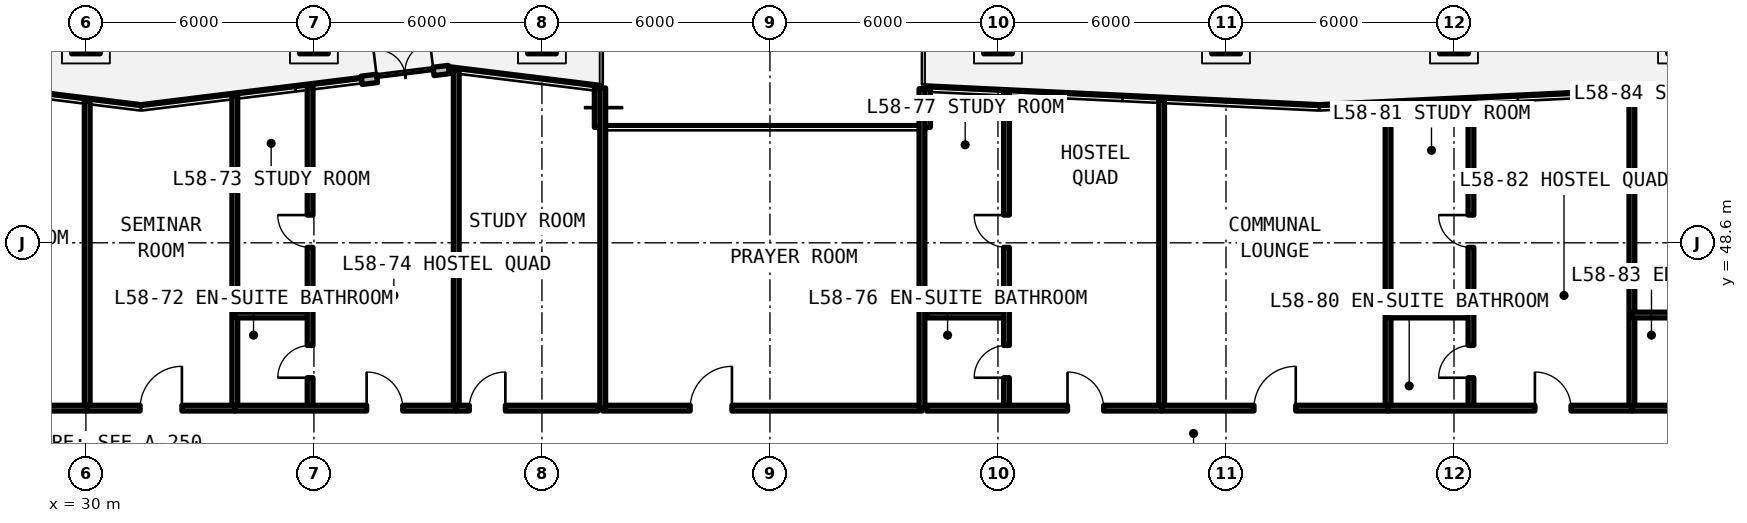
"""IFC4 building model, lengths in metres.
Left out: names, types, materials, properties, quantities, classifications, styles, units other than length and angle.
Written with IfcOpenShell. Run it as: python <this file> out.ifc"""

import sys

from ifc_helpers import new_model, si_unit, direction, frame, frame_2d, origin, origin_2d, place, context, subcontext, project, spatial, rectangle, extrude, element, fill, save


model = new_model("IFC4")
c1 = context("Model", 3, precision=1e-05, world=origin(), true_north=direction((0.0, 1.0)))
c2 = subcontext(c1, "Body", "Model", "MODEL_VIEW")
j1 = project(units=[si_unit("LENGTHUNIT", "METRE"), si_unit("PLANEANGLEUNIT", "RADIAN")], contexts=[c1])
p1 = place(None, origin())
s1 = spatial("IfcSite", under=j1, at=p1, CompositionType="ELEMENT")
p2 = place(p1, origin())
s2 = spatial("IfcBuilding", under=s1, at=p2, CompositionType="ELEMENT")
p3 = place(p2, frame((0.0, 0.0, 208.23)))
s3 = spatial("IfcBuildingStorey", under=s2, at=p3, CompositionType="ELEMENT", Elevation=208.23)
for number, where, z_axis, x_axis in (
    (1, (30.0, 53.95, 0.0), (0.0, 0.0, 1.0), (1.0, 0.0, 0.0)),
    (2, (36.0, 53.95, 0.0), (0.0, 0.0, 1.0), (1.0, 0.0, 0.0)),
    (3, (42.0, 53.95, 0.0), (0.0, 0.0, 1.0), (1.0, 0.0, 0.0)),
    (4, (54.0, 53.95, 0.0), (0.0, 0.0, 1.0), (1.0, 0.0, 0.0)),
    (5, (60.0, 53.95, 0.0), (0.0, 0.0, 1.0), (1.0, 0.0, 0.0)),
    (6, (66.0, 53.95, 0.0), (0.0, 0.0, 1.0), (1.0, 0.0, 0.0)),
):
    element("IfcColumn", number, at=place(p3, frame(where, z_axis=z_axis, x_axis=x_axis)), inside=s3, PredefinedType="COLUMN", context=c2, shape_type="SweptSolid", body=[
        extrude(rectangle(XDim=0.75, YDim=0.75, at=origin_2d()), origin(), (0.0, 0.0, 1.0), 3.63),
    ])
p4 = place(p3, frame((52.11, 52.655, 0.0), z_axis=(0.0, 0.0, 1.0), x_axis=(0.0, -1.0, 0.0)))
e7 = element("IfcWall", 7, at=p4, inside=s3, PredefinedType="SOLIDWALL", context=c2, shape_type="SweptSolid", body=[
    extrude(rectangle(XDim=1.015, YDim=0.22, at=frame_2d((0.507, 0.0))), origin(), (0.0, 0.0, 1.0), 3.41),
])
p5 = place(p3, frame((43.49, 51.64, 0.0), z_axis=(0.0, 0.0, 1.0), x_axis=(0.0, 1.0, 0.0)))
e8 = element("IfcWall", 8, at=p5, inside=s3, PredefinedType="SOLIDWALL", context=c2, shape_type="SweptSolid", body=[
    extrude(rectangle(XDim=1.033, YDim=0.22, at=frame_2d((0.516, 0.0))), origin(), (0.0, 0.0, 1.0), 3.41),
])
p6 = place(p3, frame((39.55, 53.159, 0.0), z_axis=(0.0, 0.0, 1.0), x_axis=(-0.992470150867, -0.122486732494, 0.0)))
e9 = element("IfcWall", 9, at=p6, inside=s3, PredefinedType="SOLIDWALL", context=c2, shape_type="SweptSolid", body=[
    extrude(rectangle(XDim=2.31, YDim=0.22, at=frame_2d((1.155, 0.0))), origin(), (0.0, 0.0, 1.0), 3.41),
])
p7 = place(p6, frame((0.405, 0.0, 0.0)))
e10 = element("IfcOpeningElement", 10, at=p7, cuts=e9, PredefinedType="OPENING", context=c2, shape_type="SweptSolid", body=[
    extrude(rectangle(XDim=1.5, YDim=2.2, at=frame_2d((0.75, 1.1))), frame((0.0, 0.12, 0.0), z_axis=(0.0, -1.0, 0.0), x_axis=(1.0, 0.0, 0.0)), (0.0, 0.0, 1.0), 0.24),
])
p8 = place(p3, frame((43.6, 44.25, 0.0), z_axis=(0.0, 0.0, 1.0), x_axis=(1.0, 0.0, 0.0)))
e11 = element("IfcWall", 11, at=p8, inside=s3, PredefinedType="SOLIDWALL", context=c2, shape_type="SweptSolid", body=[
    extrude(rectangle(XDim=8.4, YDim=0.15, at=frame_2d((4.2, 0.0))), origin(), (0.0, 0.0, 1.0), 2.63),
])
p9 = place(p8, frame((2.3, 0.0, 0.0)))
e12 = element("IfcOpeningElement", 12, at=p9, cuts=e11, PredefinedType="OPENING", context=c2, shape_type="SweptSolid", body=[
    extrude(rectangle(XDim=1.1, YDim=2.15, at=frame_2d((0.55, 1.075))), frame((0.0, 0.085, 0.0), z_axis=(0.0, -1.0, 0.0), x_axis=(1.0, 0.0, 0.0)), (0.0, 0.0, 1.0), 0.17),
])
p10 = place(p3, frame((43.6, 44.25, 0.0), z_axis=(0.0, 0.0, 1.0), x_axis=(0.0, 1.0, 0.0)))
e13 = element("IfcWall", 13, at=p10, inside=s3, PredefinedType="SOLIDWALL", context=c2, shape_type="SweptSolid", body=[
    extrude(rectangle(XDim=8.424, YDim=0.15, at=frame_2d((4.212, 0.0))), origin(), (0.0, 0.0, 1.0), 2.63),
])
p11 = place(p3, frame((52.0, 44.25, 0.0), z_axis=(0.0, 0.0, 1.0), x_axis=(0.0, 1.0, 0.0)))
e14 = element("IfcWall", 14, at=p11, inside=s3, PredefinedType="SOLIDWALL", context=c2, shape_type="SweptSolid", body=[
    extrude(rectangle(XDim=8.404, YDim=0.15, at=frame_2d((4.202, 0.0))), origin(), (0.0, 0.0, 1.0), 2.63),
])
p12 = place(p3, frame((30.034, 44.25, 0.0), z_axis=(0.0, 0.0, 1.0), x_axis=(0.0, 1.0, 0.0)))
e15 = element("IfcWall", 15, at=p12, inside=s3, PredefinedType="SOLIDWALL", context=c2, shape_type="SweptSolid", body=[
    extrude(rectangle(XDim=8.084, YDim=0.15, at=frame_2d((4.042, 0.0))), origin(), (0.0, 0.0, 1.0), 2.63),
])
p13 = place(p3, frame((26.0, 44.25, 0.0), z_axis=(0.0, 0.0, 1.0), x_axis=(1.0, 0.0, 0.0)))
e16 = element("IfcWall", 16, at=p13, inside=s3, PredefinedType="SOLIDWALL", context=c2, shape_type="SweptSolid", body=[
    extrude(rectangle(XDim=4.034, YDim=0.15, at=frame_2d((2.017, 0.0))), origin(), (0.0, 0.0, 1.0), 2.63),
])
p14 = place(p13, frame((1.542, 0.0, 0.0)))
e17 = element("IfcOpeningElement", 17, at=p14, cuts=e16, PredefinedType="OPENING", context=c2, shape_type="SweptSolid", body=[
    extrude(rectangle(XDim=0.95, YDim=2.15, at=frame_2d((0.475, 1.075))), frame((0.0, 0.085, 0.0), z_axis=(0.0, -1.0, 0.0), x_axis=(1.0, 0.0, 0.0)), (0.0, 0.0, 1.0), 0.17),
])
p15 = place(p3, frame((33.918, 44.25, 0.0), z_axis=(0.0, 0.0, 1.0), x_axis=(0.0, 1.0, 0.0)))
e18 = element("IfcWall", 18, at=p15, inside=s3, PredefinedType="SOLIDWALL", context=c2, shape_type="SweptSolid", body=[
    extrude(rectangle(XDim=8.214, YDim=0.15, at=frame_2d((4.107, 0.0))), origin(), (0.0, 0.0, 1.0), 2.63),
])
p16 = place(p3, frame((30.034, 44.25, 0.0), z_axis=(0.0, 0.0, 1.0), x_axis=(1.0, 0.0, 0.0)))
e19 = element("IfcWall", 19, at=p16, inside=s3, PredefinedType="SOLIDWALL", context=c2, shape_type="SweptSolid", body=[
    extrude(rectangle(XDim=3.885, YDim=0.15, at=frame_2d((1.942, 0.0))), origin(), (0.0, 0.0, 1.0), 2.63),
])
p17 = place(p16, frame((1.392, 0.0, 0.0)))
e20 = element("IfcOpeningElement", 20, at=p17, cuts=e19, PredefinedType="OPENING", context=c2, shape_type="SweptSolid", body=[
    extrude(rectangle(XDim=1.1, YDim=2.15, at=frame_2d((0.55, 1.075))), frame((0.0, 0.085, 0.0), z_axis=(0.0, -1.0, 0.0), x_axis=(1.0, 0.0, 0.0)), (0.0, 0.0, 1.0), 0.17),
])
p18 = place(p3, frame((39.745, 44.25, 0.0), z_axis=(0.0, 0.0, 1.0), x_axis=(0.0, 1.0, 0.0)))
e21 = element("IfcWall", 21, at=p18, inside=s3, PredefinedType="SOLIDWALL", context=c2, shape_type="SweptSolid", body=[
    extrude(rectangle(XDim=8.885, YDim=0.15, at=frame_2d((4.442, 0.0))), origin(), (0.0, 0.0, 1.0), 2.63),
])
p19 = place(p3, frame((33.918, 46.7, 0.0), z_axis=(0.0, 0.0, 1.0), x_axis=(1.0, 0.0, 0.0)))
e22 = element("IfcWall", 22, at=p19, inside=s3, PredefinedType="PARTITIONING", context=c2, shape_type="SweptSolid", body=[
    extrude(rectangle(XDim=1.981, YDim=0.15, at=frame_2d((0.991, 0.0))), origin(), (0.0, 0.0, 1.0), 2.63),
])
p20 = place(p3, frame((35.899, 44.25, 0.0), z_axis=(0.0, 0.0, 1.0), x_axis=(0.0, 1.0, 0.0)))
e23 = element("IfcWall", 23, at=p20, inside=s3, PredefinedType="PARTITIONING", context=c2, shape_type="SweptSolid", body=[
    extrude(rectangle(XDim=8.458, YDim=0.15, at=frame_2d((4.229, 0.0))), origin(), (0.0, 0.0, 1.0), 2.63),
])
p21 = place(p20, frame((0.8, 0.0, 0.0)))
e24 = element("IfcOpeningElement", 24, at=p21, cuts=e23, PredefinedType="OPENING", context=c2, shape_type="SweptSolid", body=[
    extrude(rectangle(XDim=0.85, YDim=2.1, at=frame_2d((0.425, 1.05))), frame((0.0, 0.085, 0.0), z_axis=(0.0, -1.0, 0.0), x_axis=(1.0, 0.0, 0.0)), (0.0, 0.0, 1.0), 0.17),
])
p22 = place(p20, frame((4.23, 0.0, 0.0)))
e25 = element("IfcOpeningElement", 25, at=p22, cuts=e23, PredefinedType="OPENING", context=c2, shape_type="SweptSolid", body=[
    extrude(rectangle(XDim=0.85, YDim=2.1, at=frame_2d((0.425, 1.05))), frame((0.0, 0.085, 0.0), z_axis=(0.0, -1.0, 0.0), x_axis=(1.0, 0.0, 0.0)), (0.0, 0.0, 1.0), 0.17),
])
p23 = place(p3, frame((33.918, 44.25, 0.0), z_axis=(0.0, 0.0, 1.0), x_axis=(1.0, 0.0, 0.0)))
e26 = element("IfcWall", 26, at=p23, inside=s3, PredefinedType="SOLIDWALL", context=c2, shape_type="SweptSolid", body=[
    extrude(rectangle(XDim=5.827, YDim=0.15, at=frame_2d((2.913, 0.0))), origin(), (0.0, 0.0, 1.0), 2.63),
])
p24 = place(p23, frame((3.469, 0.0, 0.0)))
e27 = element("IfcOpeningElement", 27, at=p24, cuts=e26, PredefinedType="OPENING", context=c2, shape_type="SweptSolid", body=[
    extrude(rectangle(XDim=0.95, YDim=2.15, at=frame_2d((0.475, 1.075))), frame((0.0, 0.085, 0.0), z_axis=(0.0, -1.0, 0.0), x_axis=(1.0, 0.0, 0.0)), (0.0, 0.0, 1.0), 0.17),
])
p25 = place(p3, frame((39.745, 44.25, 0.0), z_axis=(0.0, 0.0, 1.0), x_axis=(1.0, 0.0, 0.0)))
e28 = element("IfcWall", 28, at=p25, inside=s3, PredefinedType="SOLIDWALL", context=c2, shape_type="SweptSolid", body=[
    extrude(rectangle(XDim=3.735, YDim=0.15, at=frame_2d((1.868, 0.0))), origin(), (0.0, 0.0, 1.0), 2.63),
])
p26 = place(p25, frame((0.343, 0.0, 0.0)))
e29 = element("IfcOpeningElement", 29, at=p26, cuts=e28, PredefinedType="OPENING", context=c2, shape_type="SweptSolid", body=[
    extrude(rectangle(XDim=0.95, YDim=2.15, at=frame_2d((0.475, 1.075))), frame((0.0, 0.085, 0.0), z_axis=(0.0, -1.0, 0.0), x_axis=(1.0, 0.0, 0.0)), (0.0, 0.0, 1.0), 0.17),
])
p27 = place(p3, frame((58.307, 44.25, 0.0), z_axis=(0.0, 0.0, 1.0), x_axis=(0.0, 1.0, 0.0)))
e30 = element("IfcWall", 30, at=p27, inside=s3, PredefinedType="SOLIDWALL", context=c2, shape_type="SweptSolid", body=[
    extrude(rectangle(XDim=8.108, YDim=0.15, at=frame_2d((4.054, 0.0))), origin(), (0.0, 0.0, 1.0), 2.63),
])
p28 = place(p3, frame((52.12, 46.7, 0.0), z_axis=(0.0, 0.0, 1.0), x_axis=(1.0, 0.0, 0.0)))
e31 = element("IfcWall", 31, at=p28, inside=s3, PredefinedType="PARTITIONING", context=c2, shape_type="SweptSolid", body=[
    extrude(rectangle(XDim=2.104, YDim=0.15, at=frame_2d((1.052, 0.0))), origin(), (0.0, 0.0, 1.0), 2.63),
])
p29 = place(p3, frame((54.224, 44.25, 0.0), z_axis=(0.0, 0.0, 1.0), x_axis=(0.0, 1.0, 0.0)))
e32 = element("IfcWall", 32, at=p29, inside=s3, PredefinedType="PARTITIONING", context=c2, shape_type="SweptSolid", body=[
    extrude(rectangle(XDim=8.303, YDim=0.15, at=frame_2d((4.152, 0.0))), origin(), (0.0, 0.0, 1.0), 2.63),
])
p30 = place(p29, frame((0.8, 0.0, 0.0)))
e33 = element("IfcOpeningElement", 33, at=p30, cuts=e32, PredefinedType="OPENING", context=c2, shape_type="SweptSolid", body=[
    extrude(rectangle(XDim=0.85, YDim=2.1, at=frame_2d((0.425, 1.05))), frame((0.0, 0.085, 0.0), z_axis=(0.0, -1.0, 0.0), x_axis=(1.0, 0.0, 0.0)), (0.0, 0.0, 1.0), 0.17),
])
p31 = place(p29, frame((4.23, 0.0, 0.0)))
e34 = element("IfcOpeningElement", 34, at=p31, cuts=e32, PredefinedType="OPENING", context=c2, shape_type="SweptSolid", body=[
    extrude(rectangle(XDim=0.85, YDim=2.1, at=frame_2d((0.425, 1.05))), frame((0.0, 0.085, 0.0), z_axis=(0.0, -1.0, 0.0), x_axis=(1.0, 0.0, 0.0)), (0.0, 0.0, 1.0), 0.17),
])
p32 = place(p3, frame((52.12, 44.25, 0.0), z_axis=(0.0, 0.0, 1.0), x_axis=(1.0, 0.0, 0.0)))
e35 = element("IfcWall", 35, at=p32, inside=s3, PredefinedType="SOLIDWALL", context=c2, shape_type="SweptSolid", body=[
    extrude(rectangle(XDim=6.187, YDim=0.15, at=frame_2d((3.093, 0.0))), origin(), (0.0, 0.0, 1.0), 2.63),
])
p33 = place(p32, frame((3.71, 0.0, 0.0)))
e36 = element("IfcOpeningElement", 36, at=p33, cuts=e35, PredefinedType="OPENING", context=c2, shape_type="SweptSolid", body=[
    extrude(rectangle(XDim=0.95, YDim=2.15, at=frame_2d((0.475, 1.075))), frame((0.0, 0.085, 0.0), z_axis=(0.0, -1.0, 0.0), x_axis=(1.0, 0.0, 0.0)), (0.0, 0.0, 1.0), 0.17),
])
p34 = place(p3, frame((64.265, 44.25, 0.0), z_axis=(0.0, 0.0, 1.0), x_axis=(0.0, 1.0, 0.0)))
e37 = element("IfcWall", 37, at=p34, inside=s3, PredefinedType="SOLIDWALL", context=c2, shape_type="SweptSolid", body=[
    extrude(rectangle(XDim=7.997, YDim=0.15, at=frame_2d((3.998, 0.0))), origin(), (0.0, 0.0, 1.0), 2.63),
])
p35 = place(p3, frame((58.307, 44.25, 0.0), z_axis=(0.0, 0.0, 1.0), x_axis=(1.0, 0.0, 0.0)))
e38 = element("IfcWall", 38, at=p35, inside=s3, PredefinedType="SOLIDWALL", context=c2, shape_type="SweptSolid", body=[
    extrude(rectangle(XDim=5.958, YDim=0.15, at=frame_2d((2.979, 0.0))), origin(), (0.0, 0.0, 1.0), 2.63),
])
p36 = place(p35, frame((2.429, 0.0, 0.0)))
e39 = element("IfcOpeningElement", 39, at=p36, cuts=e38, PredefinedType="OPENING", context=c2, shape_type="SweptSolid", body=[
    extrude(rectangle(XDim=1.1, YDim=2.15, at=frame_2d((0.55, 1.075))), frame((0.0, 0.085, 0.0), z_axis=(0.0, -1.0, 0.0), x_axis=(1.0, 0.0, 0.0)), (0.0, 0.0, 1.0), 0.17),
])
p37 = place(p3, frame((70.681, 44.25, 0.0), z_axis=(0.0, 0.0, 1.0), x_axis=(0.0, 1.0, 0.0)))
e40 = element("IfcWall", 40, at=p37, inside=s3, PredefinedType="SOLIDWALL", context=c2, shape_type="SweptSolid", body=[
    extrude(rectangle(XDim=8.304, YDim=0.15, at=frame_2d((4.152, 0.0))), origin(), (0.0, 0.0, 1.0), 2.63),
])
p38 = place(p3, frame((64.265, 46.7, 0.0), z_axis=(0.0, 0.0, 1.0), x_axis=(1.0, 0.0, 0.0)))
e41 = element("IfcWall", 41, at=p38, inside=s3, PredefinedType="PARTITIONING", context=c2, shape_type="SweptSolid", body=[
    extrude(rectangle(XDim=2.181, YDim=0.15, at=frame_2d((1.091, 0.0))), origin(), (0.0, 0.0, 1.0), 2.63),
])
p39 = place(p3, frame((66.446, 44.25, 0.0), z_axis=(0.0, 0.0, 1.0), x_axis=(0.0, 1.0, 0.0)))
e42 = element("IfcWall", 42, at=p39, inside=s3, PredefinedType="PARTITIONING", context=c2, shape_type="SweptSolid", body=[
    extrude(rectangle(XDim=8.101, YDim=0.15, at=frame_2d((4.051, 0.0))), origin(), (0.0, 0.0, 1.0), 2.63),
])
p40 = place(p39, frame((0.8, 0.0, 0.0)))
e43 = element("IfcOpeningElement", 43, at=p40, cuts=e42, PredefinedType="OPENING", context=c2, shape_type="SweptSolid", body=[
    extrude(rectangle(XDim=0.85, YDim=2.1, at=frame_2d((0.425, 1.05))), frame((0.0, 0.085, 0.0), z_axis=(0.0, -1.0, 0.0), x_axis=(1.0, 0.0, 0.0)), (0.0, 0.0, 1.0), 0.17),
])
p41 = place(p39, frame((4.23, 0.0, 0.0)))
e44 = element("IfcOpeningElement", 44, at=p41, cuts=e42, PredefinedType="OPENING", context=c2, shape_type="SweptSolid", body=[
    extrude(rectangle(XDim=0.85, YDim=2.1, at=frame_2d((0.425, 1.05))), frame((0.0, 0.085, 0.0), z_axis=(0.0, -1.0, 0.0), x_axis=(1.0, 0.0, 0.0)), (0.0, 0.0, 1.0), 0.17),
])
p42 = place(p3, frame((64.265, 44.25, 0.0), z_axis=(0.0, 0.0, 1.0), x_axis=(1.0, 0.0, 0.0)))
e45 = element("IfcWall", 45, at=p42, inside=s3, PredefinedType="SOLIDWALL", context=c2, shape_type="SweptSolid", body=[
    extrude(rectangle(XDim=6.416, YDim=0.15, at=frame_2d((3.208, 0.0))), origin(), (0.0, 0.0, 1.0), 2.63),
])
p43 = place(p42, frame((3.864, 0.0, 0.0)))
e46 = element("IfcOpeningElement", 46, at=p43, cuts=e45, PredefinedType="OPENING", context=c2, shape_type="SweptSolid", body=[
    extrude(rectangle(XDim=0.95, YDim=2.15, at=frame_2d((0.475, 1.075))), frame((0.0, 0.085, 0.0), z_axis=(0.0, -1.0, 0.0), x_axis=(1.0, 0.0, 0.0)), (0.0, 0.0, 1.0), 0.17),
])
p44 = place(p3, frame((70.681, 46.7, 0.0), z_axis=(0.0, 0.0, 1.0), x_axis=(1.0, 0.0, 0.0)))
e47 = element("IfcWall", 47, at=p44, inside=s3, PredefinedType="PARTITIONING", context=c2, shape_type="SweptSolid", body=[
    extrude(rectangle(XDim=2.026, YDim=0.15, at=frame_2d((1.013, 0.0))), origin(), (0.0, 0.0, 1.0), 2.63),
])
p45 = place(p3, frame((70.681, 44.25, 0.0), z_axis=(0.0, 0.0, 1.0), x_axis=(1.0, 0.0, 0.0)))
e48 = element("IfcWall", 48, at=p45, inside=s3, PredefinedType="SOLIDWALL", context=c2, shape_type="SweptSolid", body=[
    extrude(rectangle(XDim=5.958, YDim=0.15, at=frame_2d((2.979, 0.0))), origin(), (0.0, 0.0, 1.0), 2.63),
])
p46 = place(p45, frame((3.557, 0.0, 0.0)))
e49 = element("IfcOpeningElement", 49, at=p46, cuts=e48, PredefinedType="OPENING", context=c2, shape_type="SweptSolid", body=[
    extrude(rectangle(XDim=0.95, YDim=2.15, at=frame_2d((0.475, 1.075))), frame((0.0, 0.085, 0.0), z_axis=(0.0, -1.0, 0.0), x_axis=(1.0, 0.0, 0.0)), (0.0, 0.0, 1.0), 0.17),
])
p47 = place(p7, frame((1.5, 0.0, 0.0), z_axis=(0.0, 0.0, 1.0), x_axis=(-1.0, 0.0, 0.0)))
e50 = element("IfcDoor", 50, at=p47, inside=s3, OperationType="SINGLE_SWING_RIGHT", PredefinedType="DOOR", context=c2, shape_type="SweptSolid", body=[
    extrude(rectangle(XDim=1.5, YDim=2.2, at=frame_2d((0.75, 1.1))), frame((0.0, 0.025, 0.0), z_axis=(0.0, -1.0, 0.0), x_axis=(1.0, 0.0, 0.0)), (0.0, 0.0, 1.0), 0.05),
])
fill(e10, e50)
p48 = place(p9, origin())
e51 = element("IfcDoor", 51, at=p48, inside=s3, OperationType="SINGLE_SWING_RIGHT", PredefinedType="DOOR", context=c2, shape_type="SweptSolid", body=[
    extrude(rectangle(XDim=1.1, YDim=2.15, at=frame_2d((0.55, 1.075))), frame((0.0, 0.025, 0.0), z_axis=(0.0, -1.0, 0.0), x_axis=(1.0, 0.0, 0.0)), (0.0, 0.0, 1.0), 0.05),
])
fill(e12, e51)
p49 = place(p17, origin())
e52 = element("IfcDoor", 52, at=p49, inside=s3, OperationType="SINGLE_SWING_RIGHT", PredefinedType="DOOR", context=c2, shape_type="SweptSolid", body=[
    extrude(rectangle(XDim=1.1, YDim=2.15, at=frame_2d((0.55, 1.075))), frame((0.0, 0.025, 0.0), z_axis=(0.0, -1.0, 0.0), x_axis=(1.0, 0.0, 0.0)), (0.0, 0.0, 1.0), 0.05),
])
fill(e20, e52)
p50 = place(p21, origin())
e53 = element("IfcDoor", 53, at=p50, inside=s3, OperationType="SINGLE_SWING_LEFT", PredefinedType="DOOR", context=c2, shape_type="SweptSolid", body=[
    extrude(rectangle(XDim=0.85, YDim=2.1, at=frame_2d((0.425, 1.05))), frame((0.0, 0.025, 0.0), z_axis=(0.0, -1.0, 0.0), x_axis=(1.0, 0.0, 0.0)), (0.0, 0.0, 1.0), 0.05),
])
fill(e24, e53)
p51 = place(p22, origin())
e54 = element("IfcDoor", 54, at=p51, inside=s3, OperationType="SINGLE_SWING_RIGHT", PredefinedType="DOOR", context=c2, shape_type="SweptSolid", body=[
    extrude(rectangle(XDim=0.85, YDim=2.1, at=frame_2d((0.425, 1.05))), frame((0.0, 0.025, 0.0), z_axis=(0.0, -1.0, 0.0), x_axis=(1.0, 0.0, 0.0)), (0.0, 0.0, 1.0), 0.05),
])
fill(e25, e54)
p52 = place(p24, origin())
e55 = element("IfcDoor", 55, at=p52, inside=s3, OperationType="SINGLE_SWING_LEFT", PredefinedType="DOOR", context=c2, shape_type="SweptSolid", body=[
    extrude(rectangle(XDim=0.95, YDim=2.15, at=frame_2d((0.475, 1.075))), frame((0.0, 0.025, 0.0), z_axis=(0.0, -1.0, 0.0), x_axis=(1.0, 0.0, 0.0)), (0.0, 0.0, 1.0), 0.05),
])
fill(e27, e55)
p53 = place(p26, origin())
e56 = element("IfcDoor", 56, at=p53, inside=s3, OperationType="SINGLE_SWING_RIGHT", PredefinedType="DOOR", context=c2, shape_type="SweptSolid", body=[
    extrude(rectangle(XDim=0.95, YDim=2.15, at=frame_2d((0.475, 1.075))), frame((0.0, 0.025, 0.0), z_axis=(0.0, -1.0, 0.0), x_axis=(1.0, 0.0, 0.0)), (0.0, 0.0, 1.0), 0.05),
])
fill(e29, e56)
p54 = place(p30, origin())
e57 = element("IfcDoor", 57, at=p54, inside=s3, OperationType="SINGLE_SWING_LEFT", PredefinedType="DOOR", context=c2, shape_type="SweptSolid", body=[
    extrude(rectangle(XDim=0.85, YDim=2.1, at=frame_2d((0.425, 1.05))), frame((0.0, 0.025, 0.0), z_axis=(0.0, -1.0, 0.0), x_axis=(1.0, 0.0, 0.0)), (0.0, 0.0, 1.0), 0.05),
])
fill(e33, e57)
p55 = place(p31, origin())
e58 = element("IfcDoor", 58, at=p55, inside=s3, OperationType="SINGLE_SWING_RIGHT", PredefinedType="DOOR", context=c2, shape_type="SweptSolid", body=[
    extrude(rectangle(XDim=0.85, YDim=2.1, at=frame_2d((0.425, 1.05))), frame((0.0, 0.025, 0.0), z_axis=(0.0, -1.0, 0.0), x_axis=(1.0, 0.0, 0.0)), (0.0, 0.0, 1.0), 0.05),
])
fill(e34, e58)
p56 = place(p33, origin())
e59 = element("IfcDoor", 59, at=p56, inside=s3, OperationType="SINGLE_SWING_LEFT", PredefinedType="DOOR", context=c2, shape_type="SweptSolid", body=[
    extrude(rectangle(XDim=0.95, YDim=2.15, at=frame_2d((0.475, 1.075))), frame((0.0, 0.025, 0.0), z_axis=(0.0, -1.0, 0.0), x_axis=(1.0, 0.0, 0.0)), (0.0, 0.0, 1.0), 0.05),
])
fill(e36, e59)
p57 = place(p36, origin())
e60 = element("IfcDoor", 60, at=p57, inside=s3, OperationType="SINGLE_SWING_RIGHT", PredefinedType="DOOR", context=c2, shape_type="SweptSolid", body=[
    extrude(rectangle(XDim=1.1, YDim=2.15, at=frame_2d((0.55, 1.075))), frame((0.0, 0.025, 0.0), z_axis=(0.0, -1.0, 0.0), x_axis=(1.0, 0.0, 0.0)), (0.0, 0.0, 1.0), 0.05),
])
fill(e39, e60)
p58 = place(p40, origin())
e61 = element("IfcDoor", 61, at=p58, inside=s3, OperationType="SINGLE_SWING_LEFT", PredefinedType="DOOR", context=c2, shape_type="SweptSolid", body=[
    extrude(rectangle(XDim=0.85, YDim=2.1, at=frame_2d((0.425, 1.05))), frame((0.0, 0.025, 0.0), z_axis=(0.0, -1.0, 0.0), x_axis=(1.0, 0.0, 0.0)), (0.0, 0.0, 1.0), 0.05),
])
fill(e43, e61)
p59 = place(p41, origin())
e62 = element("IfcDoor", 62, at=p59, inside=s3, OperationType="SINGLE_SWING_RIGHT", PredefinedType="DOOR", context=c2, shape_type="SweptSolid", body=[
    extrude(rectangle(XDim=0.85, YDim=2.1, at=frame_2d((0.425, 1.05))), frame((0.0, 0.025, 0.0), z_axis=(0.0, -1.0, 0.0), x_axis=(1.0, 0.0, 0.0)), (0.0, 0.0, 1.0), 0.05),
])
fill(e44, e62)
p60 = place(p43, origin())
e63 = element("IfcDoor", 63, at=p60, inside=s3, OperationType="SINGLE_SWING_LEFT", PredefinedType="DOOR", context=c2, shape_type="SweptSolid", body=[
    extrude(rectangle(XDim=0.95, YDim=2.15, at=frame_2d((0.475, 1.075))), frame((0.0, 0.025, 0.0), z_axis=(0.0, -1.0, 0.0), x_axis=(1.0, 0.0, 0.0)), (0.0, 0.0, 1.0), 0.05),
])
fill(e46, e63)
save(model, sys.argv[1])
